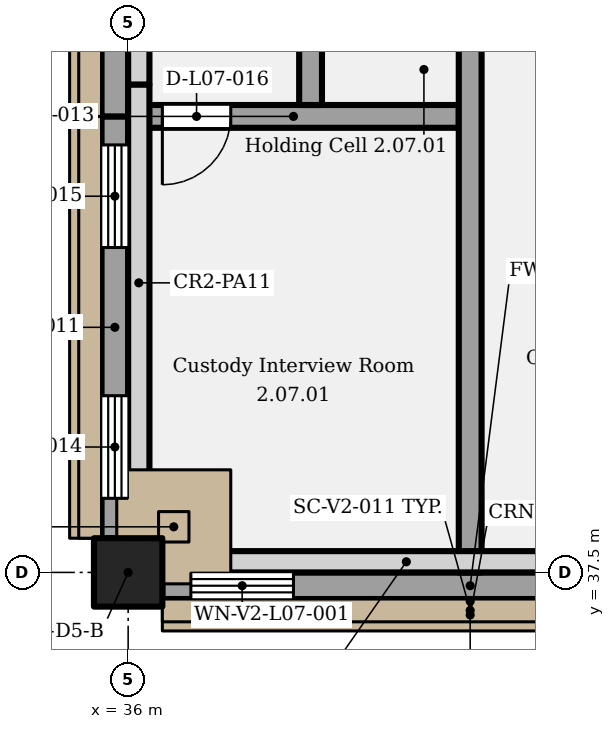
"""IFC4 building model, lengths in metres.
Left out: names, types, materials, properties, quantities, classifications, styles, units other than length and angle.
Written with IfcOpenShell. Run it as: python <this file> out.ifc"""

import sys

from ifc_helpers import new_model, si_unit, direction, frame, frame_2d, origin, origin_2d, place, context, subcontext, project, spatial, rectangle, extrude, element, fill, save


model = new_model("IFC4")
c1 = context("Model", 3, precision=1e-05, world=origin(), true_north=direction((0.0, 1.0)))
c2 = subcontext(c1, "Body", "Model", "MODEL_VIEW")
j1 = project(units=[si_unit("LENGTHUNIT", "METRE"), si_unit("PLANEANGLEUNIT", "RADIAN")], contexts=[c1])
p1 = place(None, origin())
s1 = spatial("IfcSite", under=j1, at=p1, CompositionType="ELEMENT")
p2 = place(p1, origin())
s2 = spatial("IfcBuilding", under=s1, at=p2, CompositionType="ELEMENT")
p3 = place(p2, frame((0.0, 0.0, 39.0)))
s3 = spatial("IfcBuildingStorey", under=s2, at=p3, CompositionType="ELEMENT", Elevation=39.0)
p4 = place(p3, frame((36.0, 37.5, 0.0), z_axis=(0.0, 0.0, 1.0), x_axis=(1.0, 0.0, 0.0)))
e1 = element("IfcColumn", 1, at=p4, inside=s3, PredefinedType="COLUMN", context=c2, shape_type="SweptSolid", body=[
    extrude(rectangle(XDim=0.9, YDim=0.9, at=origin_2d()), origin(), (0.0, 0.0, 1.0), 5.4),
])
p5 = place(p3, frame((36.45, 37.325, 0.0), z_axis=(0.0, 0.0, 1.0), x_axis=(1.0, 0.0, 0.0)))
e2 = element("IfcWall", 2, at=p5, inside=s3, PredefinedType="SOLIDWALL", context=c2, shape_type="SweptSolid", body=[
    extrude(rectangle(XDim=8.1, YDim=0.35, at=frame_2d((4.05, 0.0))), origin(), (0.0, 0.0, 1.0), 5.15),
])
p6 = place(p5, frame((0.375, 0.0, 1.2)))
e3 = element("IfcOpeningElement", 3, at=p6, cuts=e2, PredefinedType="OPENING", context=c2, shape_type="SweptSolid", body=[
    extrude(rectangle(XDim=1.35, YDim=3.0, at=frame_2d((0.675, 1.5))), frame((0.0, 0.185, 0.0), z_axis=(0.0, -1.0, 0.0), x_axis=(1.0, 0.0, 0.0)), (0.0, 0.0, 1.0), 0.37),
])
p7 = place(p5, frame((6.375, 0.0, 1.2)))
e4 = element("IfcOpeningElement", 4, at=p7, cuts=e2, PredefinedType="OPENING", context=c2, shape_type="SweptSolid", body=[
    extrude(rectangle(XDim=1.35, YDim=3.0, at=frame_2d((0.675, 1.5))), frame((0.0, 0.185, 0.0), z_axis=(0.0, -1.0, 0.0), x_axis=(1.0, 0.0, 0.0)), (0.0, 0.0, 1.0), 0.37),
])
p8 = place(p3, frame((35.825, 37.95, 0.0), z_axis=(0.0, 0.0, 1.0), x_axis=(0.0, 1.0, 0.0)))
e5 = element("IfcWall", 5, at=p8, inside=s3, PredefinedType="SOLIDWALL", context=c2, shape_type="SweptSolid", body=[
    extrude(rectangle(XDim=5.55, YDim=0.35, at=frame_2d((2.775, 0.0))), origin(), (0.0, 0.0, 1.0), 5.15),
])
p9 = place(p8, frame((0.525, 0.0, 1.2)))
e6 = element("IfcOpeningElement", 6, at=p9, cuts=e5, PredefinedType="OPENING", context=c2, shape_type="SweptSolid", body=[
    extrude(rectangle(XDim=1.35, YDim=3.0, at=frame_2d((0.675, 1.5))), frame((0.0, 0.185, 0.0), z_axis=(0.0, -1.0, 0.0), x_axis=(1.0, 0.0, 0.0)), (0.0, 0.0, 1.0), 0.37),
])
p10 = place(p8, frame((3.825, 0.0, 1.2)))
e7 = element("IfcOpeningElement", 7, at=p10, cuts=e5, PredefinedType="OPENING", context=c2, shape_type="SweptSolid", body=[
    extrude(rectangle(XDim=1.35, YDim=3.0, at=frame_2d((0.675, 1.5))), frame((0.0, 0.185, 0.0), z_axis=(0.0, -1.0, 0.0), x_axis=(1.0, 0.0, 0.0)), (0.0, 0.0, 1.0), 0.37),
])
p11 = place(p3, frame((35.825, 43.5, 0.0), z_axis=(0.0, 0.0, 1.0), x_axis=(0.0, 1.0, 0.0)))
e8 = element("IfcWall", 8, at=p11, inside=s3, PredefinedType="SOLIDWALL", context=c2, shape_type="SweptSolid", body=[
    extrude(rectangle(XDim=10.05, YDim=0.35, at=frame_2d((5.025, 0.0))), origin(), (0.0, 0.0, 1.0), 5.15),
])
p12 = place(p11, frame((1.575, 0.0, 1.2)))
e9 = element("IfcOpeningElement", 9, at=p12, cuts=e8, PredefinedType="OPENING", context=c2, shape_type="SweptSolid", body=[
    extrude(rectangle(XDim=1.35, YDim=3.0, at=frame_2d((0.675, 1.5))), frame((0.0, 0.185, 0.0), z_axis=(0.0, -1.0, 0.0), x_axis=(1.0, 0.0, 0.0)), (0.0, 0.0, 1.0), 0.37),
])
p13 = place(p11, frame((4.875, 0.0, 1.2)))
e10 = element("IfcOpeningElement", 10, at=p13, cuts=e8, PredefinedType="OPENING", context=c2, shape_type="SweptSolid", body=[
    extrude(rectangle(XDim=1.35, YDim=3.0, at=frame_2d((0.675, 1.5))), frame((0.0, 0.185, 0.0), z_axis=(0.0, -1.0, 0.0), x_axis=(1.0, 0.0, 0.0)), (0.0, 0.0, 1.0), 0.37),
])
p14 = place(p11, frame((8.175, 0.0, 1.2)))
e11 = element("IfcOpeningElement", 11, at=p14, cuts=e8, PredefinedType="OPENING", context=c2, shape_type="SweptSolid", body=[
    extrude(rectangle(XDim=1.35, YDim=3.0, at=frame_2d((0.675, 1.5))), frame((0.0, 0.185, 0.0), z_axis=(0.0, -1.0, 0.0), x_axis=(1.0, 0.0, 0.0)), (0.0, 0.0, 1.0), 0.37),
])
p15 = place(p3, frame((36.0, 38.1, 5.4), z_axis=(0.0, 0.0, 1.0), x_axis=(1.0, 0.0, 0.0)))
e12 = element("IfcWall", 12, at=p15, inside=s3, PredefinedType="SOLIDWALL", context=c2, shape_type="SweptSolid", body=[
    extrude(rectangle(XDim=1.2, YDim=1.2, at=frame_2d((0.6, 0.0))), origin(), (0.0, 0.0, 1.0), 3.0),
])
p16 = place(p3, frame((37.2, 37.64, 5.4), z_axis=(0.0, 0.0, 1.0), x_axis=(1.0, 0.0, 0.0)))
e13 = element("IfcWall", 13, at=p16, inside=s3, PredefinedType="PARAPET", context=c2, shape_type="SweptSolid", body=[
    extrude(rectangle(XDim=4.92, YDim=0.28, at=frame_2d((2.46, 0.0))), origin(), (0.0, 0.0, 1.0), 1.2),
])
p17 = place(p3, frame((36.14, 38.7, 5.4), z_axis=(0.0, 0.0, 1.0), x_axis=(0.0, 1.0, 0.0)))
e14 = element("IfcWall", 14, at=p17, inside=s3, PredefinedType="PARAPET", context=c2, shape_type="SweptSolid", body=[
    extrude(rectangle(XDim=5.22, YDim=0.28, at=frame_2d((2.61, 0.0))), origin(), (0.0, 0.0, 1.0), 1.2),
])
p18 = place(p3, frame((36.14, 43.92, 5.4), z_axis=(0.0, 0.0, 1.0), x_axis=(0.0, 1.0, 0.0)))
e15 = element("IfcWall", 15, at=p18, inside=s3, PredefinedType="PARAPET", context=c2, shape_type="SweptSolid", body=[
    extrude(rectangle(XDim=5.22, YDim=0.28, at=frame_2d((2.61, 0.0))), origin(), (0.0, 0.0, 1.0), 1.4),
])
p19 = place(p3, frame((36.0, 43.5, 0.0), z_axis=(0.0, 0.0, 1.0), x_axis=(1.0, 0.0, 0.0)))
e16 = element("IfcWall", 16, at=p19, inside=s3, PredefinedType="PARTITIONING", context=c2, shape_type="SweptSolid", body=[
    extrude(rectangle(XDim=4.35, YDim=0.3, at=frame_2d((2.175, 0.0))), origin(), (0.0, 0.0, 1.0), 5.15),
])
p20 = place(p19, frame((1.35, 0.0, 0.0), z_axis=(0.0, 0.0, 1.0), x_axis=(-1.0, 0.0, 0.0)))
e17 = element("IfcOpeningElement", 17, at=p20, cuts=e16, PredefinedType="OPENING", context=c2, shape_type="SweptSolid", body=[
    extrude(rectangle(XDim=0.9, YDim=2.1, at=frame_2d((0.45, 1.05))), frame((0.0, 0.16, 0.0), z_axis=(0.0, -1.0, 0.0), x_axis=(1.0, 0.0, 0.0)), (0.0, 0.0, 1.0), 0.32),
])
p21 = place(p3, frame((38.4, 43.65, 0.0), z_axis=(0.0, 0.0, 1.0), x_axis=(0.0, 1.0, 0.0)))
e18 = element("IfcWall", 18, at=p21, inside=s3, PredefinedType="PARTITIONING", context=c2, shape_type="SweptSolid", body=[
    extrude(rectangle(XDim=10.35, YDim=0.3, at=frame_2d((5.175, 0.0))), origin(), (0.0, 0.0, 1.0), 5.15),
])
p22 = place(p21, frame((2.05, 0.0, 0.0), z_axis=(0.0, 0.0, 1.0), x_axis=(-1.0, 0.0, 0.0)))
e19 = element("IfcOpeningElement", 19, at=p22, cuts=e18, PredefinedType="OPENING", context=c2, shape_type="SweptSolid", body=[
    extrude(rectangle(XDim=0.9, YDim=2.0, at=frame_2d((0.45, 1.0))), frame((0.0, 0.16, 0.0), z_axis=(0.0, -1.0, 0.0), x_axis=(1.0, 0.0, 0.0)), (0.0, 0.0, 1.0), 0.32),
])
p23 = place(p21, frame((5.55, 0.0, 0.0), z_axis=(0.0, 0.0, 1.0), x_axis=(-1.0, 0.0, 0.0)))
e20 = element("IfcOpeningElement", 20, at=p23, cuts=e18, PredefinedType="OPENING", context=c2, shape_type="SweptSolid", body=[
    extrude(rectangle(XDim=0.9, YDim=2.0, at=frame_2d((0.45, 1.0))), frame((0.0, 0.16, 0.0), z_axis=(0.0, -1.0, 0.0), x_axis=(1.0, 0.0, 0.0)), (0.0, 0.0, 1.0), 0.32),
])
p24 = place(p21, frame((9.05, 0.0, 0.0), z_axis=(0.0, 0.0, 1.0), x_axis=(-1.0, 0.0, 0.0)))
e21 = element("IfcOpeningElement", 21, at=p24, cuts=e18, PredefinedType="OPENING", context=c2, shape_type="SweptSolid", body=[
    extrude(rectangle(XDim=0.9, YDim=2.0, at=frame_2d((0.45, 1.0))), frame((0.0, 0.16, 0.0), z_axis=(0.0, -1.0, 0.0), x_axis=(1.0, 0.0, 0.0)), (0.0, 0.0, 1.0), 0.32),
])
p25 = place(p3, frame((40.5, 37.5, 0.0), z_axis=(0.0, 0.0, 1.0), x_axis=(0.0, 1.0, 0.0)))
e22 = element("IfcWall", 22, at=p25, inside=s3, PredefinedType="PARTITIONING", context=c2, shape_type="SweptSolid", body=[
    extrude(rectangle(XDim=16.5, YDim=0.3, at=frame_2d((8.25, 0.0))), origin(), (0.0, 0.0, 1.0), 5.15),
])
p26 = place(p25, frame((14.25, 0.0, 0.0)))
e23 = element("IfcOpeningElement", 23, at=p26, cuts=e22, PredefinedType="OPENING", context=c2, shape_type="SweptSolid", body=[
    extrude(rectangle(XDim=1.0, YDim=2.0, at=frame_2d((0.5, 1.0))), frame((0.0, 0.16, 0.0), z_axis=(0.0, -1.0, 0.0), x_axis=(1.0, 0.0, 0.0)), (0.0, 0.0, 1.0), 0.32),
])
p27 = place(p6, origin())
e24 = element("IfcWindow", 24, at=p27, inside=s3, PartitioningType="SINGLE_PANEL", PredefinedType="WINDOW", context=c2, shape_type="SweptSolid", body=[
    extrude(rectangle(XDim=1.35, YDim=3.0, at=frame_2d((0.675, 1.5))), frame((0.0, 0.03, 0.0), z_axis=(0.0, -1.0, 0.0), x_axis=(1.0, 0.0, 0.0)), (0.0, 0.0, 1.0), 0.06),
])
fill(e3, e24)
p28 = place(p9, origin())
e25 = element("IfcWindow", 25, at=p28, inside=s3, PartitioningType="SINGLE_PANEL", PredefinedType="WINDOW", context=c2, shape_type="SweptSolid", body=[
    extrude(rectangle(XDim=1.35, YDim=3.0, at=frame_2d((0.675, 1.5))), frame((0.0, 0.03, 0.0), z_axis=(0.0, -1.0, 0.0), x_axis=(1.0, 0.0, 0.0)), (0.0, 0.0, 1.0), 0.06),
])
fill(e6, e25)
p29 = place(p10, origin())
e26 = element("IfcWindow", 26, at=p29, inside=s3, PartitioningType="SINGLE_PANEL", PredefinedType="WINDOW", context=c2, shape_type="SweptSolid", body=[
    extrude(rectangle(XDim=1.35, YDim=3.0, at=frame_2d((0.675, 1.5))), frame((0.0, 0.03, 0.0), z_axis=(0.0, -1.0, 0.0), x_axis=(1.0, 0.0, 0.0)), (0.0, 0.0, 1.0), 0.06),
])
fill(e7, e26)
p30 = place(p20, origin())
e27 = element("IfcDoor", 27, at=p30, inside=s3, OperationType="SINGLE_SWING_RIGHT", PredefinedType="DOOR", context=c2, shape_type="SweptSolid", body=[
    extrude(rectangle(XDim=0.9, YDim=2.1, at=frame_2d((0.45, 1.05))), frame((0.0, 0.025, 0.0), z_axis=(0.0, -1.0, 0.0), x_axis=(1.0, 0.0, 0.0)), (0.0, 0.0, 1.0), 0.05),
])
fill(e17, e27)
save(model, sys.argv[1])
